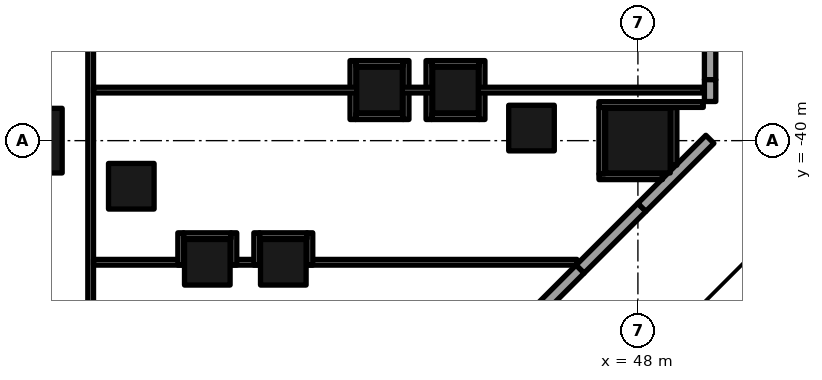
"""IFC4 building model, lengths in metres.
Left out: names, types, materials, properties, quantities, classifications, styles, units other than length and angle.
Written with IfcOpenShell. Run it as: python <this file> out.ifc"""

import sys

from ifc_helpers import new_model, si_unit, direction, frame, frame_2d, origin, origin_2d, place, context, subcontext, project, spatial, rectangle, extrude, element, fill, save


model = new_model("IFC4")
c1 = context("Model", 3, precision=1e-05, world=origin(), true_north=direction((0.0, 1.0)))
c2 = subcontext(c1, "Body", "Model", "MODEL_VIEW")
j1 = project(units=[si_unit("LENGTHUNIT", "METRE"), si_unit("PLANEANGLEUNIT", "RADIAN")], contexts=[c1])
p1 = place(None, origin())
s1 = spatial("IfcSite", under=j1, at=p1, CompositionType="ELEMENT")
p2 = place(p1, origin())
s2 = spatial("IfcBuilding", under=s1, at=p2, CompositionType="ELEMENT")
p3 = place(p2, origin())
s3 = spatial("IfcBuildingStorey", under=s2, at=p3, CompositionType="ELEMENT", Elevation=0.0)
for number, where, z_axis, x_axis in (
    (1, (32.0, -40.0, 0.0), (0.0, 0.0, 1.0), (1.0, 0.0, 0.0)),
    (2, (48.0, -40.0, 0.0), (0.0, 0.0, 1.0), (1.0, 0.0, 0.0)),
):
    element("IfcColumn", number, at=place(p3, frame(where, z_axis=z_axis, x_axis=x_axis)), inside=s3, PredefinedType="COLUMN", context=c2, shape_type="SweptSolid", body=[
        extrude(rectangle(XDim=1.7, YDim=1.7, at=origin_2d()), origin(), (0.0, 0.0, 1.0), 9.0),
    ])
for number, where, z_axis, x_axis in (
    (3, (34.669, -41.2, 0.0), (0.0, 0.0, 1.0), (1.0, 0.0, 0.0)),
    (4, (41.2, -38.669, 0.0), (0.0, 0.0, 1.0), (1.0, 0.0, 0.0)),
    (5, (36.669, -43.2, 0.0), (0.0, 0.0, 1.0), (1.0, 0.0, 0.0)),
    (6, (43.2, -38.669, 0.0), (0.0, 0.0, 1.0), (1.0, 0.0, 0.0)),
    (7, (38.669, -43.2, 0.0), (0.0, 0.0, 1.0), (1.0, 0.0, 0.0)),
    (8, (45.2, -39.669, 0.0), (0.0, 0.0, 1.0), (1.0, 0.0, 0.0)),
):
    element("IfcColumn", number, at=place(p3, frame(where, z_axis=z_axis, x_axis=x_axis)), inside=s3, PredefinedType="COLUMN", context=c2, shape_type="SweptSolid", body=[
        extrude(rectangle(XDim=1.2, YDim=1.2, at=origin_2d()), origin(), (0.0, 0.0, 1.0), 9.0),
    ])
p4 = place(p3, frame((46.477, -43.381, 0.0), z_axis=(0.0, 0.0, 1.0), x_axis=(0.707159853336, 0.707053705054, 0.0)))
e9 = element("IfcWall", 9, at=p4, inside=s3, PredefinedType="ELEMENTEDWALL", context=c2, shape_type="SweptSolid", body=[
    extrude(rectangle(XDim=2.3, YDim=0.3, at=frame_2d((1.15, 0.0))), origin(), (0.0, 0.0, 1.0), 7.6),
])
p5 = place(p4, frame((0.4, 0.0, 0.0)))
e10 = element("IfcOpeningElement", 10, at=p5, cuts=e9, PredefinedType="OPENING", context=c2, shape_type="SweptSolid", body=[
    extrude(rectangle(XDim=1.5, YDim=2.7, at=frame_2d((0.75, 1.35))), frame((0.0, 0.16, 0.0), z_axis=(0.0, -1.0, 0.0), x_axis=(1.0, 0.0, 0.0)), (0.0, 0.0, 1.0), 0.32),
])
p6 = place(p3, frame((44.271, -45.588, 0.0), z_axis=(0.0, 0.0, 1.0), x_axis=(0.707067655068, 0.70714590514, 0.0)))
e11 = element("IfcWall", 11, at=p6, inside=s3, PredefinedType="SOLIDWALL", context=c2, shape_type="SweptSolid", body=[
    extrude(rectangle(XDim=3.12, YDim=0.3, at=frame_2d((1.56, 0.0))), origin(), (0.0, 0.0, 1.0), 7.6),
])
p7 = place(p3, frame((48.104, -41.755, 0.0), z_axis=(0.0, 0.0, 1.0), x_axis=(0.707106781187, 0.707106781187, 0.0)))
e12 = element("IfcWall", 12, at=p7, inside=s3, PredefinedType="SOLIDWALL", context=c2, shape_type="SweptSolid", body=[
    extrude(rectangle(XDim=2.532, YDim=0.3, at=frame_2d((1.266, 0.0))), origin(), (0.0, 0.0, 1.0), 7.6),
])
p8 = place(p3, frame((49.9, -38.396, 0.0), z_axis=(0.0, 0.0, 1.0), x_axis=(0.0, 1.0, 0.0)))
e13 = element("IfcWall", 13, at=p8, inside=s3, PredefinedType="ELEMENTEDWALL", context=c2, shape_type="SweptSolid", body=[
    extrude(rectangle(XDim=2.898, YDim=0.3, at=frame_2d((1.449, 0.0))), origin(), (0.0, 0.0, 1.0), 7.6),
])
p9 = place(p8, frame((0.4, 0.0, 0.0)))
e14 = element("IfcOpeningElement", 14, at=p9, cuts=e13, PredefinedType="OPENING", context=c2, shape_type="SweptSolid", body=[
    extrude(rectangle(XDim=2.0, YDim=2.7, at=frame_2d((1.0, 1.35))), frame((0.0, 0.16, 0.0), z_axis=(0.0, -1.0, 0.0), x_axis=(1.0, 0.0, 0.0)), (0.0, 0.0, 1.0), 0.32),
])
p10 = place(p3, frame((49.9, -38.97, 0.0), z_axis=(0.0, 0.0, 1.0), x_axis=(0.0, 1.0, 0.0)))
e15 = element("IfcWall", 15, at=p10, inside=s3, PredefinedType="SOLIDWALL", context=c2, shape_type="SweptSolid", body=[
    extrude(rectangle(XDim=0.574, YDim=0.3, at=frame_2d((0.287, 0.0))), origin(), (0.0, 0.0, 1.0), 7.6),
])
p11 = place(p3, frame((44.042, -45.745, 9.0), z_axis=(0.0, 0.0, 1.0), x_axis=(0.7071215324, 0.707092029666, 0.0)))
e16 = element("IfcWall", 16, at=p11, inside=s3, PredefinedType="PARAPET", context=c2, shape_type="SweptSolid", body=[
    extrude(rectangle(XDim=8.275, YDim=0.3, at=frame_2d((4.138, 0.0))), origin(), (0.0, 0.0, 1.0), 1.1),
])
p12 = place(p3, frame((49.85, -39.79, 9.0), z_axis=(0.0, 0.0, 1.0), x_axis=(0.0, 1.0, 0.0)))
e17 = element("IfcWall", 17, at=p12, inside=s3, PredefinedType="PARAPET", context=c2, shape_type="SweptSolid", body=[
    extrude(rectangle(XDim=14.698, YDim=0.3, at=frame_2d((7.349, 0.0))), origin(), (0.0, 0.0, 1.0), 1.1),
])
p13 = place(p3, frame((33.6, -44.6, 0.0), z_axis=(0.0, 0.0, 1.0), x_axis=(0.0, 1.0, 0.0)))
e18 = element("IfcWall", 18, at=p13, inside=s3, PredefinedType="PARTITIONING", context=c2, shape_type="SweptSolid", body=[
    extrude(rectangle(XDim=9.36, YDim=0.15, at=frame_2d((4.68, 0.0))), origin(), (0.0, 0.0, 1.0), 7.3),
])
p14 = place(p13, frame((6.68, 0.0, 0.0)))
e19 = element("IfcOpeningElement", 19, at=p14, cuts=e18, PredefinedType="OPENING", context=c2, shape_type="SweptSolid", body=[
    extrude(rectangle(XDim=1.2, YDim=2.1, at=frame_2d((0.6, 1.05))), frame((0.0, 0.085, 0.0), z_axis=(0.0, -1.0, 0.0), x_axis=(1.0, 0.0, 0.0)), (0.0, 0.0, 1.0), 0.17),
])
p15 = place(p3, frame((33.675, -43.2, 0.0), z_axis=(0.0, 0.0, 1.0), x_axis=(1.0, 0.0, 0.0)))
e20 = element("IfcWall", 20, at=p15, inside=s3, PredefinedType="PARTITIONING", context=c2, shape_type="SweptSolid", body=[
    extrude(rectangle(XDim=2.394, YDim=0.15, at=frame_2d((1.197, 0.0))), origin(), (0.0, 0.0, 1.0), 8.5),
])
p16 = place(p3, frame((35.969, -43.275, 0.0), z_axis=(0.0, 0.0, 1.0), x_axis=(0.0, 1.0, 0.0)))
e21 = element("IfcWall", 21, at=p16, inside=s3, PredefinedType="PARTITIONING", context=c2, shape_type="SweptSolid", body=[
    extrude(rectangle(XDim=0.85, YDim=0.15, at=frame_2d((0.425, 0.0))), origin(), (0.0, 0.0, 1.0), 8.5),
])
p17 = place(p3, frame((37.269, -43.2, 0.0), z_axis=(0.0, 0.0, 1.0), x_axis=(1.0, 0.0, 0.0)))
e22 = element("IfcWall", 22, at=p17, inside=s3, PredefinedType="PARTITIONING", context=c2, shape_type="SweptSolid", body=[
    extrude(rectangle(XDim=0.8, YDim=0.15, at=frame_2d((0.4, 0.0))), origin(), (0.0, 0.0, 1.0), 8.5),
])
for number, where, z_axis, x_axis in (
    (23, (37.369, -43.275, 0.0), (0.0, 0.0, 1.0), (0.0, 1.0, 0.0)),
    (24, (37.969, -43.275, 0.0), (0.0, 0.0, 1.0), (0.0, 1.0, 0.0)),
):
    element("IfcWall", number, at=place(p3, frame(where, z_axis=z_axis, x_axis=x_axis)), inside=s3, PredefinedType="PARTITIONING", context=c2, shape_type="SweptSolid", body=[
        extrude(rectangle(XDim=0.85, YDim=0.15, at=frame_2d((0.425, 0.0))), origin(), (0.0, 0.0, 1.0), 8.5),
    ])
p18 = place(p3, frame((39.269, -43.2, 0.0), z_axis=(0.0, 0.0, 1.0), x_axis=(1.0, 0.0, 0.0)))
e25 = element("IfcWall", 25, at=p18, inside=s3, PredefinedType="PARTITIONING", context=c2, shape_type="SweptSolid", body=[
    extrude(rectangle(XDim=7.127, YDim=0.15, at=frame_2d((3.563, 0.0))), origin(), (0.0, 0.0, 1.0), 7.6),
])
p19 = place(p3, frame((39.369, -43.275, 0.0), z_axis=(0.0, 0.0, 1.0), x_axis=(0.0, 1.0, 0.0)))
e26 = element("IfcWall", 26, at=p19, inside=s3, PredefinedType="PARTITIONING", context=c2, shape_type="SweptSolid", body=[
    extrude(rectangle(XDim=0.85, YDim=0.15, at=frame_2d((0.425, 0.0))), origin(), (0.0, 0.0, 1.0), 8.5),
])
for number, where, z_axis, x_axis in (
    (27, (36.044, -42.5, 0.0), (0.0, 0.0, 1.0), (1.0, 0.0, 0.0)),
    (28, (38.044, -42.5, 0.0), (0.0, 0.0, 1.0), (1.0, 0.0, 0.0)),
):
    element("IfcWall", number, at=place(p3, frame(where, z_axis=z_axis, x_axis=x_axis)), inside=s3, PredefinedType="PARTITIONING", context=c2, shape_type="SweptSolid", body=[
        extrude(rectangle(XDim=1.25, YDim=0.15, at=frame_2d((0.625, 0.0))), origin(), (0.0, 0.0, 1.0), 8.5),
    ])
p20 = place(p3, frame((46.975, -40.95, 0.0), z_axis=(0.0, 0.0, 1.0), x_axis=(1.0, 0.0, 0.0)))
e29 = element("IfcWall", 29, at=p20, inside=s3, PredefinedType="PARTITIONING", context=c2, shape_type="SweptSolid", body=[
    extrude(rectangle(XDim=1.671, YDim=0.15, at=frame_2d((0.835, 0.0))), origin(), (0.0, 0.0, 1.0), 7.6),
])
p21 = place(p3, frame((47.05, -40.875, 0.0), z_axis=(0.0, 0.0, 1.0), x_axis=(0.0, 1.0, 0.0)))
e30 = element("IfcWall", 30, at=p21, inside=s3, PredefinedType="PARTITIONING", context=c2, shape_type="SweptSolid", body=[
    extrude(rectangle(XDim=1.75, YDim=0.15, at=frame_2d((0.875, 0.0))), origin(), (0.0, 0.0, 1.0), 7.6),
])
p22 = place(p3, frame((48.95, -40.646, 0.0), z_axis=(0.0, 0.0, 1.0), x_axis=(0.0, 1.0, 0.0)))
e31 = element("IfcWall", 31, at=p22, inside=s3, PredefinedType="PARTITIONING", context=c2, shape_type="SweptSolid", body=[
    extrude(rectangle(XDim=1.521, YDim=0.15, at=frame_2d((0.76, 0.0))), origin(), (0.0, 0.0, 1.0), 8.5),
])
p23 = place(p3, frame((40.5, -39.444, 0.0), z_axis=(0.0, 0.0, 1.0), x_axis=(0.0, 1.0, 0.0)))
e32 = element("IfcWall", 32, at=p23, inside=s3, PredefinedType="PARTITIONING", context=c2, shape_type="SweptSolid", body=[
    extrude(rectangle(XDim=1.55, YDim=0.15, at=frame_2d((0.775, 0.0))), origin(), (0.0, 0.0, 1.0), 8.5),
])
p24 = place(p3, frame((40.575, -39.369, 0.0), z_axis=(0.0, 0.0, 1.0), x_axis=(1.0, 0.0, 0.0)))
e33 = element("IfcWall", 33, at=p24, inside=s3, PredefinedType="PARTITIONING", context=c2, shape_type="SweptSolid", body=[
    extrude(rectangle(XDim=1.25, YDim=0.15, at=frame_2d((0.625, 0.0))), origin(), (0.0, 0.0, 1.0), 8.5),
])
for number, where, z_axis, x_axis in (
    (34, (41.9, -39.444, 0.0), (0.0, 0.0, 1.0), (0.0, 1.0, 0.0)),
    (35, (42.5, -39.444, 0.0), (0.0, 0.0, 1.0), (0.0, 1.0, 0.0)),
):
    element("IfcWall", number, at=place(p3, frame(where, z_axis=z_axis, x_axis=x_axis)), inside=s3, PredefinedType="PARTITIONING", context=c2, shape_type="SweptSolid", body=[
        extrude(rectangle(XDim=1.55, YDim=0.15, at=frame_2d((0.775, 0.0))), origin(), (0.0, 0.0, 1.0), 8.5),
    ])
p25 = place(p3, frame((42.575, -39.369, 0.0), z_axis=(0.0, 0.0, 1.0), x_axis=(1.0, 0.0, 0.0)))
e36 = element("IfcWall", 36, at=p25, inside=s3, PredefinedType="PARTITIONING", context=c2, shape_type="SweptSolid", body=[
    extrude(rectangle(XDim=1.25, YDim=0.15, at=frame_2d((0.625, 0.0))), origin(), (0.0, 0.0, 1.0), 8.5),
])
p26 = place(p3, frame((43.9, -39.444, 0.0), z_axis=(0.0, 0.0, 1.0), x_axis=(0.0, 1.0, 0.0)))
e37 = element("IfcWall", 37, at=p26, inside=s3, PredefinedType="PARTITIONING", context=c2, shape_type="SweptSolid", body=[
    extrude(rectangle(XDim=1.55, YDim=0.15, at=frame_2d((0.775, 0.0))), origin(), (0.0, 0.0, 1.0), 8.5),
])
p27 = place(p3, frame((46.975, -39.05, 0.0), z_axis=(0.0, 0.0, 1.0), x_axis=(1.0, 0.0, 0.0)))
e38 = element("IfcWall", 38, at=p27, inside=s3, PredefinedType="PARTITIONING", context=c2, shape_type="SweptSolid", body=[
    extrude(rectangle(XDim=2.745, YDim=0.15, at=frame_2d((1.373, 0.0))), origin(), (0.0, 0.0, 1.0), 7.6),
])
p28 = place(p3, frame((33.675, -38.67, 0.0), z_axis=(0.0, 0.0, 1.0), x_axis=(1.0, 0.0, 0.0)))
e39 = element("IfcWall", 39, at=p28, inside=s3, PredefinedType="PARTITIONING", context=c2, shape_type="SweptSolid", body=[
    extrude(rectangle(XDim=6.925, YDim=0.15, at=frame_2d((3.462, 0.0))), origin(), (0.0, 0.0, 1.0), 8.5),
])
p29 = place(p3, frame((41.8, -38.67, 0.0), z_axis=(0.0, 0.0, 1.0), x_axis=(1.0, 0.0, 0.0)))
e40 = element("IfcWall", 40, at=p29, inside=s3, PredefinedType="PARTITIONING", context=c2, shape_type="SweptSolid", body=[
    extrude(rectangle(XDim=0.8, YDim=0.15, at=frame_2d((0.4, 0.0))), origin(), (0.0, 0.0, 1.0), 8.5),
])
p30 = place(p3, frame((43.8, -38.67, 0.0), z_axis=(0.0, 0.0, 1.0), x_axis=(1.0, 0.0, 0.0)))
e41 = element("IfcWall", 41, at=p30, inside=s3, PredefinedType="PARTITIONING", context=c2, shape_type="SweptSolid", body=[
    extrude(rectangle(XDim=5.92, YDim=0.15, at=frame_2d((2.96, 0.0))), origin(), (0.0, 0.0, 1.0), 7.6),
])
for number, where, z_axis, x_axis in (
    (42, (40.575, -37.969, 0.0), (0.0, 0.0, 1.0), (1.0, 0.0, 0.0)),
    (43, (42.575, -37.969, 0.0), (0.0, 0.0, 1.0), (1.0, 0.0, 0.0)),
):
    element("IfcWall", number, at=place(p3, frame(where, z_axis=z_axis, x_axis=x_axis)), inside=s3, PredefinedType="PARTITIONING", context=c2, shape_type="SweptSolid", body=[
        extrude(rectangle(XDim=1.25, YDim=0.15, at=frame_2d((0.625, 0.0))), origin(), (0.0, 0.0, 1.0), 8.5),
    ])
p31 = place(p5, origin())
e44 = element("IfcDoor", 44, at=p31, inside=s3, OperationType="DOUBLE_DOOR_SINGLE_SWING", PredefinedType="DOOR", context=c2, shape_type="SweptSolid", body=[
    extrude(rectangle(XDim=1.5, YDim=2.7, at=frame_2d((0.75, 1.35))), frame((0.0, 0.025, 0.0), z_axis=(0.0, -1.0, 0.0), x_axis=(1.0, 0.0, 0.0)), (0.0, 0.0, 1.0), 0.05),
])
fill(e10, e44)
p32 = place(p9, origin())
e45 = element("IfcDoor", 45, at=p32, inside=s3, OperationType="DOUBLE_DOOR_SINGLE_SWING", PredefinedType="DOOR", context=c2, shape_type="SweptSolid", body=[
    extrude(rectangle(XDim=2.0, YDim=2.7, at=frame_2d((1.0, 1.35))), frame((0.0, 0.025, 0.0), z_axis=(0.0, -1.0, 0.0), x_axis=(1.0, 0.0, 0.0)), (0.0, 0.0, 1.0), 0.05),
])
fill(e14, e45)
p33 = place(p14, origin())
e46 = element("IfcDoor", 46, at=p33, inside=s3, OperationType="SINGLE_SWING_LEFT", PredefinedType="DOOR", context=c2, shape_type="SweptSolid", body=[
    extrude(rectangle(XDim=1.2, YDim=2.1, at=frame_2d((0.6, 1.05))), frame((0.0, 0.025, 0.0), z_axis=(0.0, -1.0, 0.0), x_axis=(1.0, 0.0, 0.0)), (0.0, 0.0, 1.0), 0.05),
])
fill(e19, e46)
save(model, sys.argv[1])
